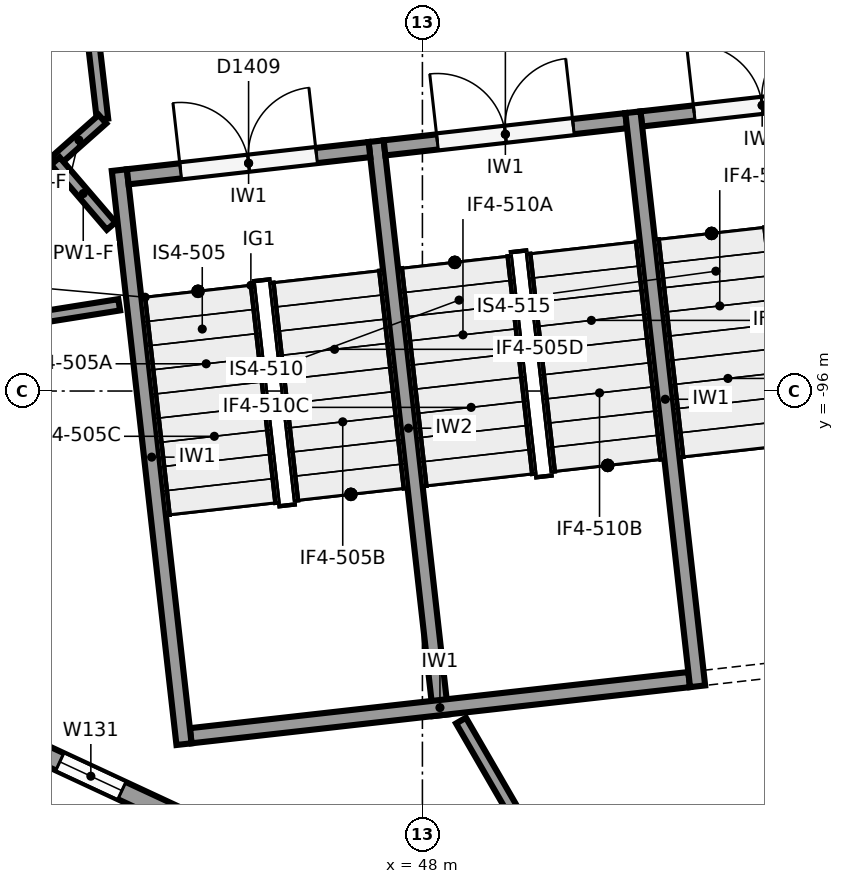
"""IFC4 building model, lengths in metres.
Left out: names, types, materials, properties, quantities, classifications, styles, units other than length and angle.
Written with IfcOpenShell. Run it as: python <this file> out.ifc"""

import sys

from ifc_helpers import new_model, si_unit, direction, frame, frame_2d, origin, origin_2d, place, context, subcontext, project, spatial, rectangle, circle, extrude, element, fill, save


model = new_model("IFC4")
c1 = context("Model", 3, precision=1e-05, world=origin(), true_north=direction((0.0, 1.0)))
c2 = subcontext(c1, "Body", "Model", "MODEL_VIEW")
j1 = project(units=[si_unit("LENGTHUNIT", "METRE"), si_unit("PLANEANGLEUNIT", "RADIAN")], contexts=[c1])
p1 = place(None, origin())
s1 = spatial("IfcSite", under=j1, at=p1, CompositionType="ELEMENT")
p2 = place(p1, origin())
s2 = spatial("IfcBuilding", under=s1, at=p2, CompositionType="ELEMENT")
p3 = place(p2, frame((0.0, 0.0, 18.0)))
s3 = spatial("IfcBuildingStorey", under=s2, at=p3, CompositionType="ELEMENT", Elevation=18.0)
p4 = place(p3, frame((44.683, -91.091, 0.0), z_axis=(0.0, 0.0, 1.0), x_axis=(1.0, 0.0, 0.0)))
e1 = element("IfcColumn", 1, at=p4, inside=s3, PredefinedType="COLUMN", context=c2, shape_type="SweptSolid", body=[
    extrude(circle(Radius=0.55, at=origin_2d()), origin(), (0.0, 0.0, 1.0), 6.0),
])
p5 = place(p3, frame((51.569, -104.757, 0.0), z_axis=(0.0, 0.0, 1.0), x_axis=(-0.906698705786, 0.421778919491, 0.0)))
e2 = element("IfcWall", 2, at=p5, inside=s3, PredefinedType="SOLIDWALL", context=c2, shape_type="SweptSolid", body=[
    extrude(rectangle(XDim=14.148, YDim=0.25, at=frame_2d((7.074, 0.0))), origin(), (0.0, 0.0, 1.0), 4.3),
])
p6 = place(p5, frame((12.498, 0.0, 1.0)))
e3 = element("IfcOpeningElement", 3, at=p6, cuts=e2, PredefinedType="OPENING", context=c2, shape_type="SweptSolid", body=[
    extrude(rectangle(XDim=0.9, YDim=3.25, at=frame_2d((0.45, 1.625))), frame((0.0, 0.135, 0.0), z_axis=(0.0, -1.0, 0.0), x_axis=(1.0, 0.0, 0.0)), (0.0, 0.0, 1.0), 0.27),
])
p7 = place(p5, frame((10.397, 0.0, 1.0)))
e4 = element("IfcOpeningElement", 4, at=p7, cuts=e2, PredefinedType="OPENING", context=c2, shape_type="SweptSolid", body=[
    extrude(rectangle(XDim=0.9, YDim=3.25, at=frame_2d((0.45, 1.625))), frame((0.0, 0.135, 0.0), z_axis=(0.0, -1.0, 0.0), x_axis=(1.0, 0.0, 0.0)), (0.0, 0.0, 1.0), 0.27),
])
p8 = place(p5, frame((8.297, 0.0, 1.0)))
e5 = element("IfcOpeningElement", 5, at=p8, cuts=e2, PredefinedType="OPENING", context=c2, shape_type="SweptSolid", body=[
    extrude(rectangle(XDim=0.9, YDim=3.25, at=frame_2d((0.45, 1.625))), frame((0.0, 0.135, 0.0), z_axis=(0.0, -1.0, 0.0), x_axis=(1.0, 0.0, 0.0)), (0.0, 0.0, 1.0), 0.27),
])
p9 = place(p3, frame((44.863, -100.646, 0.0), z_axis=(0.0, 0.0, 1.0), x_axis=(-0.111951003472, 0.993713727802, 0.0)))
e6 = element("IfcWall", 6, at=p9, inside=s3, PredefinedType="SHEAR", context=c2, shape_type="SweptSolid", body=[
    extrude(rectangle(XDim=7.6, YDim=0.2, at=frame_2d((3.8, 0.0))), origin(), (0.0, 0.0, 1.0), 5.6),
])
p10 = place(p3, frame((51.621, -99.885, 0.0), z_axis=(0.0, 0.0, 1.0), x_axis=(-0.111947429915, 0.993714130389, 0.0)))
e7 = element("IfcWall", 7, at=p10, inside=s3, PredefinedType="SHEAR", context=c2, shape_type="SweptSolid", body=[
    extrude(rectangle(XDim=7.6, YDim=0.2, at=frame_2d((3.8, 0.0))), origin(), (0.0, 0.0, 1.0), 5.6),
])
for number, where, z_axis, x_axis in (
    (8, (44.951, -100.535, 0.0), (0.0, 0.0, 1.0), (0.994, 0.112, 0.0)),
    (9, (51.709, -99.774, 0.0), (0.0, 0.0, 1.0), (0.994, 0.112, 0.0)),
):
    element("IfcWall", number, at=place(p3, frame(where, z_axis=z_axis, x_axis=x_axis)), inside=s3, PredefinedType="SHEAR", context=c2, shape_type="SweptSolid", body=[
        extrude(rectangle(XDim=6.6, YDim=0.2, at=frame_2d((3.3, 0.0))), origin(), (0.0, 0.0, 1.0), 5.6),
    ])
p11 = place(p3, frame((48.242, -100.265, 0.0), z_axis=(0.0, 0.0, 1.0), x_axis=(-0.111954577255, 0.993713325176, 0.0)))
e10 = element("IfcWall", 10, at=p11, inside=s3, PredefinedType="SHEAR", context=c2, shape_type="SweptSolid", body=[
    extrude(rectangle(XDim=7.6, YDim=0.2, at=frame_2d((3.8, 0.0))), origin(), (0.0, 0.0, 1.0), 5.6),
])
p12 = place(p3, frame((44.123, -93.182, 0.0), z_axis=(0.0, 0.0, 1.0), x_axis=(0.993717005286, 0.11192190762, 0.0)))
e11 = element("IfcWall", 11, at=p12, inside=s3, PredefinedType="SHEAR", context=c2, shape_type="SweptSolid", body=[
    extrude(rectangle(XDim=3.2, YDim=0.2, at=frame_2d((1.6, 0.0))), origin(), (0.0, 0.0, 1.0), 5.6),
])
p13 = place(p12, frame((0.7, 0.0, 0.0)))
e12 = element("IfcOpeningElement", 12, at=p13, cuts=e11, PredefinedType="OPENING", context=c2, shape_type="SweptSolid", body=[
    extrude(rectangle(XDim=1.8, YDim=2.1, at=frame_2d((0.9, 1.05))), frame((0.0, 0.11, 0.0), z_axis=(0.0, -1.0, 0.0), x_axis=(1.0, 0.0, 0.0)), (0.0, 0.0, 1.0), 0.22),
])
p14 = place(p3, frame((47.502, -92.801, 0.0), z_axis=(0.0, 0.0, 1.0), x_axis=(0.993707560215, 0.112005735442, 0.0)))
e13 = element("IfcWall", 13, at=p14, inside=s3, PredefinedType="SHEAR", context=c2, shape_type="SweptSolid", body=[
    extrude(rectangle(XDim=3.2, YDim=0.2, at=frame_2d((1.6, 0.0))), origin(), (0.0, 0.0, 1.0), 5.6),
])
p15 = place(p14, frame((0.7, 0.0, 0.0)))
e14 = element("IfcOpeningElement", 14, at=p15, cuts=e13, PredefinedType="OPENING", context=c2, shape_type="SweptSolid", body=[
    extrude(rectangle(XDim=1.8, YDim=2.1, at=frame_2d((0.9, 1.05))), frame((0.0, 0.11, 0.0), z_axis=(0.0, -1.0, 0.0), x_axis=(1.0, 0.0, 0.0)), (0.0, 0.0, 1.0), 0.22),
])
p16 = place(p3, frame((50.88, -92.42, 0.0), z_axis=(0.0, 0.0, 1.0), x_axis=(0.993707560215, 0.112005735442, 0.0)))
e15 = element("IfcWall", 15, at=p16, inside=s3, PredefinedType="SHEAR", context=c2, shape_type="SweptSolid", body=[
    extrude(rectangle(XDim=3.2, YDim=0.2, at=frame_2d((1.6, 0.0))), origin(), (0.0, 0.0, 1.0), 5.6),
])
p17 = place(p16, frame((0.7, 0.0, 0.0)))
e16 = element("IfcOpeningElement", 16, at=p17, cuts=e15, PredefinedType="OPENING", context=c2, shape_type="SweptSolid", body=[
    extrude(rectangle(XDim=1.8, YDim=2.1, at=frame_2d((0.9, 1.05))), frame((0.0, 0.11, 0.0), z_axis=(0.0, -1.0, 0.0), x_axis=(1.0, 0.0, 0.0)), (0.0, 0.0, 1.0), 0.22),
])
p18 = place(p3, frame((37.891, -95.841, 0.0), z_axis=(0.0, 0.0, 1.0), x_axis=(0.987522859615, 0.157475717929, 0.0)))
e17 = element("IfcWall", 17, at=p18, inside=s3, PredefinedType="PARTITIONING", context=c2, shape_type="SweptSolid", body=[
    extrude(rectangle(XDim=6.197, YDim=0.15, at=frame_2d((3.098, 0.0))), origin(), (0.0, 0.0, 1.0), 5.6),
])
p19 = place(p3, frame((48.508, -100.336, 0.0), z_axis=(0.0, 0.0, 1.0), x_axis=(0.500439359674, -0.865771590715, 0.0)))
e18 = element("IfcWall", 18, at=p19, inside=s3, PredefinedType="PARTITIONING", context=c2, shape_type="SweptSolid", body=[
    extrude(rectangle(XDim=3.822, YDim=0.15, at=frame_2d((1.911, 0.0))), origin(), (0.0, 0.0, 1.0), 5.6),
])
p20 = place(p3, frame((42.865, -84.478, 0.0), z_axis=(0.0, 0.0, 1.0), x_axis=(0.115729147229, -0.993280808473, 0.0)))
e19 = element("IfcWall", 19, at=p20, inside=s3, PredefinedType="PARTITIONING", context=c2, shape_type="SweptSolid", body=[
    extrude(rectangle(XDim=8.0, YDim=0.15, at=frame_2d((4.0, 0.0))), origin(), (0.0, 0.0, 1.0), 2.85),
])
p21 = place(p20, frame((4.35, 0.0, 0.0)))
e20 = element("IfcOpeningElement", 20, at=p21, cuts=e19, PredefinedType="OPENING", context=c2, shape_type="SweptSolid", body=[
    extrude(rectangle(XDim=1.8, YDim=2.1, at=frame_2d((0.9, 1.05))), frame((0.0, 0.085, 0.0), z_axis=(0.0, -1.0, 0.0), x_axis=(1.0, 0.0, 0.0)), (0.0, 0.0, 1.0), 0.17),
])
p22 = place(p3, frame((43.791, -92.423, 0.0), z_axis=(0.0, 0.0, 1.0), x_axis=(-0.748350259109, -0.66330376879, 0.0)))
e21 = element("IfcWall", 21, at=p22, inside=s3, PredefinedType="PARTITIONING", context=c2, shape_type="SweptSolid", body=[
    extrude(rectangle(XDim=0.83, YDim=0.15, at=frame_2d((0.415, 0.0))), origin(), (0.0, 0.0, 1.0), 2.914),
])
p23 = place(p3, frame((43.17, -92.974, 0.0), z_axis=(0.0, 0.0, 1.0), x_axis=(0.651040876816, -0.759042671208, 0.0)))
e22 = element("IfcWall", 22, at=p23, inside=s3, PredefinedType="PARTITIONING", context=c2, shape_type="SweptSolid", body=[
    extrude(rectangle(XDim=1.128, YDim=0.15, at=frame_2d((0.564, 0.0))), origin(), (0.0, 0.0, 1.0), 2.914),
])
p24 = place(p8, origin())
e23 = element("IfcWindow", 23, at=p24, inside=s3, PartitioningType="SINGLE_PANEL", PredefinedType="WINDOW", context=c2, shape_type="SweptSolid", body=[
    extrude(rectangle(XDim=0.9, YDim=3.25, at=frame_2d((0.45, 1.625))), frame((0.0, 0.03, 0.0), z_axis=(0.0, -1.0, 0.0), x_axis=(1.0, 0.0, 0.0)), (0.0, 0.0, 1.0), 0.06),
])
fill(e5, e23)
p25 = place(p13, origin())
e24 = element("IfcDoor", 24, at=p25, inside=s3, OperationType="DOUBLE_DOOR_SINGLE_SWING", PredefinedType="DOOR", context=c2, shape_type="SweptSolid", body=[
    extrude(rectangle(XDim=1.8, YDim=2.1, at=frame_2d((0.9, 1.05))), frame((0.0, 0.025, 0.0), z_axis=(0.0, -1.0, 0.0), x_axis=(1.0, 0.0, 0.0)), (0.0, 0.0, 1.0), 0.05),
])
fill(e12, e24)
p26 = place(p15, origin())
e25 = element("IfcDoor", 25, at=p26, inside=s3, OperationType="DOUBLE_DOOR_SINGLE_SWING", PredefinedType="DOOR", context=c2, shape_type="SweptSolid", body=[
    extrude(rectangle(XDim=1.8, YDim=2.1, at=frame_2d((0.9, 1.05))), frame((0.0, 0.025, 0.0), z_axis=(0.0, -1.0, 0.0), x_axis=(1.0, 0.0, 0.0)), (0.0, 0.0, 1.0), 0.05),
])
fill(e14, e25)
p27 = place(p17, origin())
e26 = element("IfcDoor", 26, at=p27, inside=s3, OperationType="DOUBLE_DOOR_SINGLE_SWING", PredefinedType="DOOR", context=c2, shape_type="SweptSolid", body=[
    extrude(rectangle(XDim=1.8, YDim=2.1, at=frame_2d((0.9, 1.05))), frame((0.0, 0.025, 0.0), z_axis=(0.0, -1.0, 0.0), x_axis=(1.0, 0.0, 0.0)), (0.0, 0.0, 1.0), 0.05),
])
fill(e16, e26)
save(model, sys.argv[1])
